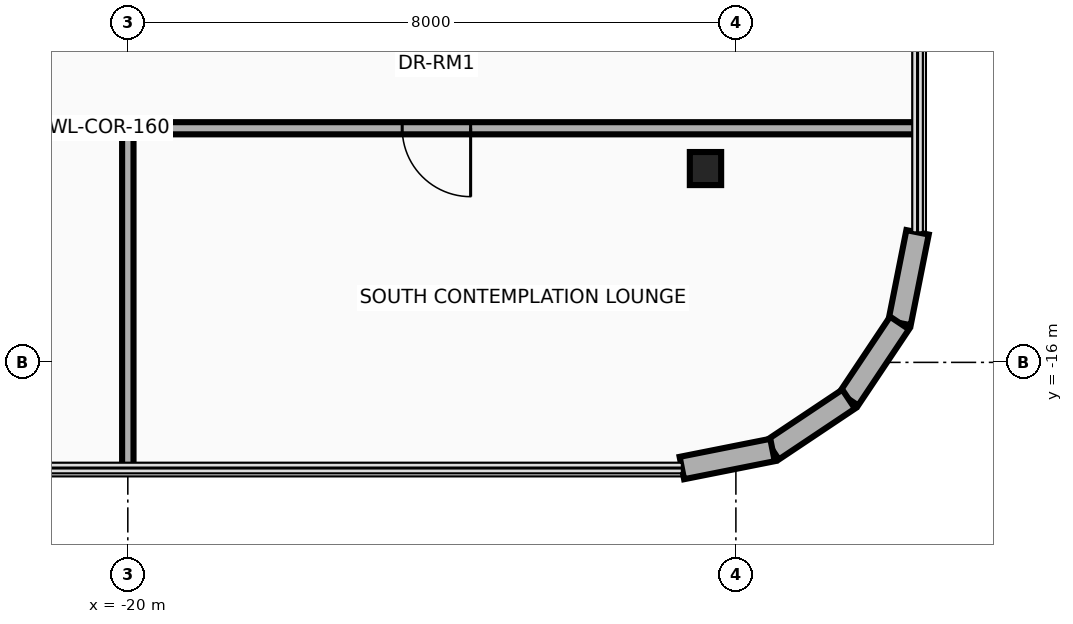
"""IFC4 building model, lengths in metres.
Left out: names, types, materials, properties, quantities, classifications, styles, units other than length and angle.
Written with IfcOpenShell. Run it as: python <this file> out.ifc"""

import sys

from ifc_helpers import new_model, si_unit, direction, frame, frame_2d, origin, origin_2d, place, context, subcontext, project, spatial, rectangle, i_section, extrude, source, transform, mapped, element, fill, save


model = new_model("IFC4")
c1 = context("Model", 3, precision=1e-05, world=origin(), true_north=direction((0.0, 1.0)))
c2 = subcontext(c1, "Body", "Model", "MODEL_VIEW")
j1 = project(units=[si_unit("LENGTHUNIT", "METRE"), si_unit("PLANEANGLEUNIT", "RADIAN")], contexts=[c1])
p1 = place(None, origin())
s1 = spatial("IfcSite", under=j1, at=p1, CompositionType="ELEMENT")
p2 = place(p1, origin())
s2 = spatial("IfcBuilding", under=s1, at=p2, CompositionType="ELEMENT")
p3 = place(p2, frame((0.0, 0.0, 201.0)))
s3 = spatial("IfcBuildingStorey", under=s2, at=p3, CompositionType="ELEMENT", Elevation=201.0)
m1 = source(origin(), c2, "Body", "SweptSolid", [
    extrude(i_section(OverallWidth=0.412, OverallDepth=0.435, WebThickness=0.036, FlangeThickness=0.057, at=origin_2d()), origin(), (0.0, 0.0, 1.0), 4.5),
])
p4 = place(p3, frame((-12.4, -13.45, 0.0), z_axis=(0.0, 0.0, 1.0), x_axis=(1.0, 0.0, 0.0)))
e1 = element("IfcColumn", 1, at=p4, inside=s3, PredefinedType="COLUMN", context=c2, shape_type="MappedRepresentation", body=[
    mapped(m1, transform((0.0, 0.0, 0.0), x_axis=(1.0, 0.0, 0.0), y_axis=(0.0, 1.0, 0.0), z_axis=(0.0, 0.0, 1.0), scale=1.0)),
])
p5 = place(p3, frame((-9.61, -14.289, 0.0), z_axis=(0.0, 0.0, 1.0), x_axis=(-0.194996050505, -0.980804027463, 0.0)))
e2 = element("IfcWall", 2, at=p5, inside=s3, PredefinedType="SOLIDWALL", context=c2, shape_type="SweptSolid", body=[
    extrude(rectangle(XDim=1.216, YDim=0.3, at=frame_2d((0.608, 0.0))), origin(), (0.0, 0.0, 1.0), 4.26),
])
for number, where, z_axis, x_axis in (
    (3, (-9.847, -15.482, 0.0), (0.0, 0.0, 1.0), (-0.556, -0.831, 0.0)),
    (4, (-10.517, -16.483, 0.0), (0.0, 0.0, 1.0), (-0.831, -0.556, 0.0)),
):
    element("IfcWall", number, at=place(p3, frame(where, z_axis=z_axis, x_axis=x_axis)), inside=s3, PredefinedType="SOLIDWALL", context=c2, shape_type="SweptSolid", body=[
        extrude(rectangle(XDim=1.205, YDim=0.3, at=frame_2d((0.603, 0.0))), origin(), (0.0, 0.0, 1.0), 4.26),
    ])
p6 = place(p3, frame((-11.518, -17.153, 0.0), z_axis=(0.0, 0.0, 1.0), x_axis=(-0.980804027463, -0.194996050505, 0.0)))
e5 = element("IfcWall", 5, at=p6, inside=s3, PredefinedType="SOLIDWALL", context=c2, shape_type="SweptSolid", body=[
    extrude(rectangle(XDim=1.216, YDim=0.3, at=frame_2d((0.608, 0.0))), origin(), (0.0, 0.0, 1.0), 4.26),
])
p7 = place(p3, frame((-30.89, -12.92, 0.0), z_axis=(0.0, 0.0, 1.0), x_axis=(1.0, 0.0, 0.0)))
e6 = element("IfcWall", 6, at=p7, inside=s3, PredefinedType="PARTITIONING", context=c2, shape_type="SweptSolid", body=[
    extrude(rectangle(XDim=21.28, YDim=0.16, at=frame_2d((10.64, 0.0))), origin(), (0.0, 0.0, 1.0), 3.634),
])
p8 = place(p7, frame((4.88, 0.0, 0.0)))
e7 = element("IfcOpeningElement", 7, at=p8, cuts=e6, PredefinedType="OPENING", context=c2, shape_type="SweptSolid", body=[
    extrude(rectangle(XDim=0.9, YDim=2.1, at=frame_2d((0.45, 1.05))), frame((0.0, 0.095, 0.0), z_axis=(0.0, -1.0, 0.0), x_axis=(1.0, 0.0, 0.0)), (0.0, 0.0, 1.0), 0.19),
])
p9 = place(p7, frame((14.5, 0.0, 0.0)))
e8 = element("IfcOpeningElement", 8, at=p9, cuts=e6, PredefinedType="OPENING", context=c2, shape_type="SweptSolid", body=[
    extrude(rectangle(XDim=0.9, YDim=2.1, at=frame_2d((0.45, 1.05))), frame((0.0, 0.095, 0.0), z_axis=(0.0, -1.0, 0.0), x_axis=(1.0, 0.0, 0.0)), (0.0, 0.0, 1.0), 0.19),
])
p10 = place(p3, frame((-20.0, -17.39, 0.0), z_axis=(0.0, 0.0, 1.0), x_axis=(0.0, 1.0, 0.0)))
e9 = element("IfcWall", 9, at=p10, inside=s3, PredefinedType="PARTITIONING", context=c2, shape_type="SweptSolid", body=[
    extrude(rectangle(XDim=4.47, YDim=0.15, at=frame_2d((2.235, 0.0))), origin(), (0.0, 0.0, 1.0), 3.706),
])
p11 = place(p9, frame((0.9, 0.0, 0.0), z_axis=(0.0, 0.0, 1.0), x_axis=(-1.0, 0.0, 0.0)))
e10 = element("IfcDoor", 10, at=p11, inside=s3, OperationType="SINGLE_SWING_LEFT", PredefinedType="DOOR", context=c2, shape_type="SweptSolid", body=[
    extrude(rectangle(XDim=0.9, YDim=2.1, at=frame_2d((0.45, 1.05))), frame((0.0, 0.025, 0.0), z_axis=(0.0, -1.0, 0.0), x_axis=(1.0, 0.0, 0.0)), (0.0, 0.0, 1.0), 0.05),
])
fill(e8, e10)
save(model, sys.argv[1])
